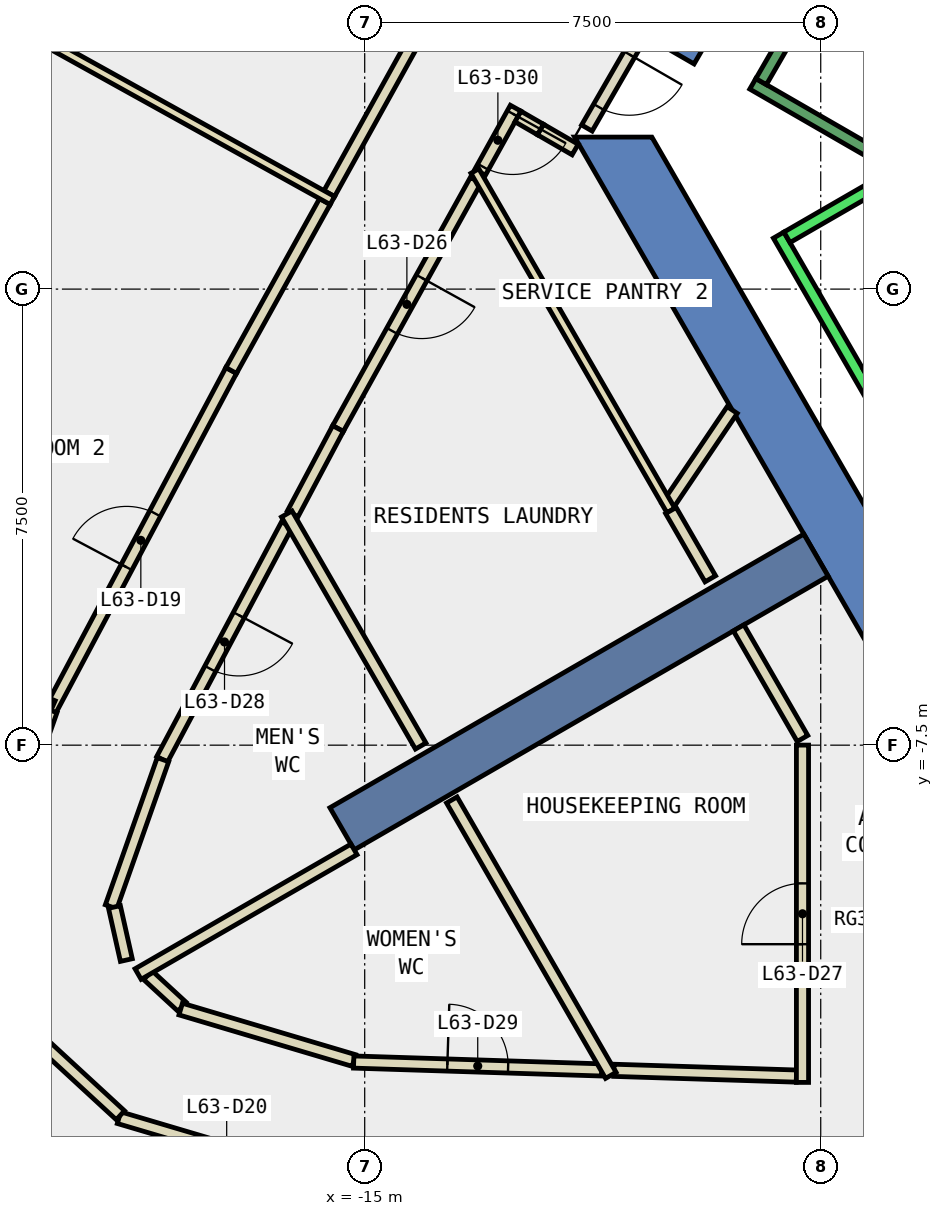
"""IFC4 building model, lengths in metres.
Left out: names, types, materials, properties, quantities, classifications, styles, units other than length and angle.
Written with IfcOpenShell. Run it as: python <this file> out.ifc"""

import sys

from ifc_helpers import new_model, si_unit, direction, frame, frame_2d, origin, place, context, subcontext, project, spatial, polyline, rectangle, outline, extrude, element, fill, save


model = new_model("IFC4")
c1 = context("Model", 3, precision=1e-05, world=origin(), true_north=direction((0.0, 1.0)))
c2 = subcontext(c1, "Body", "Model", "MODEL_VIEW")
j1 = project(units=[si_unit("LENGTHUNIT", "METRE"), si_unit("PLANEANGLEUNIT", "RADIAN")], contexts=[c1])
p1 = place(None, origin())
s1 = spatial("IfcSite", under=j1, at=p1, CompositionType="ELEMENT")
p2 = place(p1, origin())
s2 = spatial("IfcBuilding", under=s1, at=p2, CompositionType="ELEMENT")
p3 = place(p2, frame((0.0, 0.0, 273.8)))
s3 = spatial("IfcBuildingStorey", under=s2, at=p3, CompositionType="ELEMENT", Elevation=273.8)
p4 = place(p3, frame((0.0, 0.0, -0.34)))
e1 = element("IfcWall", 1, at=p4, inside=s3, PredefinedType="SHEAR", context=c2, shape_type="SweptSolid", body=[
    extrude(outline(polyline([(-10.535, 4.253), (-9.583, 3.703), (-5.138, 11.4), (-5.774, 12.5), (-10.535, 4.253)])), origin(), (0.0, 0.0, 1.0), 3.6),
])
p5 = place(p3, frame((0.0, 0.0, -0.34)))
e2 = element("IfcWall", 2, at=p5, inside=s3, PredefinedType="SHEAR", context=c2, shape_type="SweptSolid", body=[
    extrude(outline(polyline([(-11.547, 2.5), (-5.774, -7.5), (-5.138, -6.4), (-10.277, 2.5), (-11.547, 2.5)])), origin(), (0.0, 0.0, 1.0), 3.6),
])
p6 = place(p3, frame((-7.578, -4.375, -0.34), z_axis=(0.0, 0.0, 1.0), x_axis=(-0.866024315419, -0.5000018851, 0.0)))
e3 = element("IfcWall", 3, at=p6, inside=s3, PredefinedType="SHEAR", context=c2, shape_type="SweptSolid", body=[
    extrude(rectangle(XDim=9.0, YDim=0.8, at=frame_2d((4.5, 0.0))), origin(), (0.0, 0.0, 1.0), 3.6),
])
p7 = place(p3, frame((-19.984, 7.14, 0.0), z_axis=(0.0, 0.0, 1.0), x_axis=(-0.485049005017, -0.874486971162, 0.0)))
e4 = element("IfcWall", 4, at=p7, inside=s3, PredefinedType="STANDARD", context=c2, shape_type="SweptSolid", body=[
    extrude(rectangle(XDim=5.62, YDim=0.3, at=frame_2d((2.81, 0.0))), origin(), (0.0, 0.0, 1.0), 3.26),
])
p8 = place(p7, frame((0.455, 0.0, 0.9)))
e5 = element("IfcOpeningElement", 5, at=p8, cuts=e4, PredefinedType="OPENING", context=c2, shape_type="SweptSolid", body=[
    extrude(rectangle(XDim=1.9, YDim=2.0, at=frame_2d((0.95, 1.0))), frame((0.0, 0.16, 0.0), z_axis=(0.0, -1.0, 0.0), x_axis=(1.0, 0.0, 0.0)), (0.0, 0.0, 1.0), 0.32),
])
p9 = place(p7, frame((3.265, 0.0, 0.9)))
e6 = element("IfcOpeningElement", 6, at=p9, cuts=e4, PredefinedType="OPENING", context=c2, shape_type="SweptSolid", body=[
    extrude(rectangle(XDim=1.9, YDim=2.0, at=frame_2d((0.95, 1.0))), frame((0.0, 0.16, 0.0), z_axis=(0.0, -1.0, 0.0), x_axis=(1.0, 0.0, 0.0)), (0.0, 0.0, 1.0), 0.32),
])
p10 = place(p3, frame((-11.539, 2.295, 0.0), z_axis=(0.0, 0.0, 1.0), x_axis=(-0.86577241902, 0.500437926684, 0.0)))
e7 = element("IfcWall", 7, at=p10, inside=s3, PredefinedType="PARTITIONING", context=c2, shape_type="SweptSolid", body=[
    extrude(rectangle(XDim=0.66, YDim=0.2, at=frame_2d((0.33, 0.0))), origin(), (0.0, 0.0, 1.0), 2.4),
])
p11 = place(p3, frame((-12.517, 2.975, 0.0), z_axis=(0.0, 0.0, 1.0), x_axis=(-0.485195833999, -0.87440551386, 0.0)))
e8 = element("IfcWall", 8, at=p11, inside=s3, PredefinedType="PARTITIONING", context=c2, shape_type="SweptSolid", body=[
    extrude(rectangle(XDim=1.206, YDim=0.2, at=frame_2d((0.603, 0.0))), origin(), (0.0, 0.0, 1.0), 3.26),
])
p12 = place(p11, frame((0.103, 0.0, 0.0)))
e9 = element("IfcOpeningElement", 9, at=p12, cuts=e8, PredefinedType="OPENING", context=c2, shape_type="SweptSolid", body=[
    extrude(rectangle(XDim=1.0, YDim=2.1, at=frame_2d((0.5, 1.05))), frame((0.0, 0.11, 0.0), z_axis=(0.0, -1.0, 0.0), x_axis=(1.0, 0.0, 0.0)), (0.0, 0.0, 1.0), 0.22),
])
p13 = place(p3, frame((-13.174, 1.79, 0.0), z_axis=(0.0, 0.0, 1.0), x_axis=(-0.485079003918, -0.874470331091, 0.0)))
e10 = element("IfcWall", 10, at=p13, inside=s3, PredefinedType="PARTITIONING", context=c2, shape_type="SweptSolid", body=[
    extrude(rectangle(XDim=4.669, YDim=0.2, at=frame_2d((2.334, 0.0))), origin(), (0.0, 0.0, 1.0), 3.26),
])
p14 = place(p13, frame((1.834, 0.0, 0.0)))
e11 = element("IfcOpeningElement", 11, at=p14, cuts=e10, PredefinedType="OPENING", context=c2, shape_type="SweptSolid", body=[
    extrude(rectangle(XDim=1.0, YDim=2.1, at=frame_2d((0.5, 1.05))), frame((0.0, 0.11, 0.0), z_axis=(0.0, -1.0, 0.0), x_axis=(1.0, 0.0, 0.0)), (0.0, 0.0, 1.0), 0.22),
])
p15 = place(p3, frame((-15.439, -2.293, 0.0), z_axis=(0.0, 0.0, 1.0), x_axis=(-0.469248780065, -0.883066012486, 0.0)))
e12 = element("IfcWall", 12, at=p15, inside=s3, PredefinedType="PARTITIONING", context=c2, shape_type="SweptSolid", body=[
    extrude(rectangle(XDim=1.59, YDim=0.2, at=frame_2d((0.795, 0.0))), origin(), (0.0, 0.0, 1.0), 3.26),
])
p16 = place(p3, frame((-10.902, -12.847, 0.0), z_axis=(0.0, 0.0, 1.0), x_axis=(0.999500028713, -0.031617915847, 0.0)))
e13 = element("IfcWall", 13, at=p16, inside=s3, PredefinedType="PARTITIONING", context=c2, shape_type="SweptSolid", body=[
    extrude(rectangle(XDim=3.004, YDim=0.2, at=frame_2d((1.502, 0.0))), origin(), (0.0, 0.0, 1.0), 3.26),
])
p17 = place(p3, frame((-16.279, -3.873, 0.0), z_axis=(0.0, 0.0, 1.0), x_axis=(-0.469587967357, -0.882885689608, 0.0)))
e14 = element("IfcWall", 14, at=p17, inside=s3, PredefinedType="PARTITIONING", context=c2, shape_type="SweptSolid", body=[
    extrude(rectangle(XDim=4.372, YDim=0.2, at=frame_2d((2.186, 0.0))), origin(), (0.0, 0.0, 1.0), 3.26),
])
p18 = place(p17, frame((1.686, 0.0, 0.0)))
e15 = element("IfcOpeningElement", 15, at=p18, cuts=e14, PredefinedType="OPENING", context=c2, shape_type="SweptSolid", body=[
    extrude(rectangle(XDim=1.0, YDim=2.1, at=frame_2d((0.5, 1.05))), frame((0.0, 0.11, 0.0), z_axis=(0.0, -1.0, 0.0), x_axis=(1.0, 0.0, 0.0)), (0.0, 0.0, 1.0), 0.22),
])
p19 = place(p3, frame((-18.318, -7.739, 0.0), z_axis=(0.0, 0.0, 1.0), x_axis=(-0.332486504777, -0.943108012977, 0.0)))
e16 = element("IfcWall", 16, at=p19, inside=s3, PredefinedType="PARTITIONING", context=c2, shape_type="SweptSolid", body=[
    extrude(rectangle(XDim=2.565, YDim=0.2, at=frame_2d((1.282, 0.0))), origin(), (0.0, 0.0, 1.0), 3.26),
])
p20 = place(p3, frame((-19.116, -10.161, 0.0), z_axis=(0.0, 0.0, 1.0), x_axis=(0.219096654714, -0.975703159723, 0.0)))
e17 = element("IfcWall", 17, at=p20, inside=s3, PredefinedType="PARTITIONING", context=c2, shape_type="SweptSolid", body=[
    extrude(rectangle(XDim=0.895, YDim=0.2, at=frame_2d((0.447, 0.0))), origin(), (0.0, 0.0, 1.0), 3.26),
])
p21 = place(p3, frame((-18.567, -11.282, 0.0), z_axis=(0.0, 0.0, 1.0), x_axis=(0.735218904444, -0.677829744514, 0.0)))
e18 = element("IfcWall", 18, at=p21, inside=s3, PredefinedType="PARTITIONING", context=c2, shape_type="SweptSolid", body=[
    extrude(rectangle(XDim=0.766, YDim=0.2, at=frame_2d((0.383, 0.0))), origin(), (0.0, 0.0, 1.0), 3.26),
])
p22 = place(p3, frame((-18.026, -11.84, 0.0), z_axis=(0.0, 0.0, 1.0), x_axis=(0.958629704259, -0.284656090947, 0.0)))
e19 = element("IfcWall", 19, at=p22, inside=s3, PredefinedType="PARTITIONING", context=c2, shape_type="SweptSolid", body=[
    extrude(rectangle(XDim=2.972, YDim=0.2, at=frame_2d((1.486, 0.0))), origin(), (0.0, 0.0, 1.0), 3.26),
])
p23 = place(p3, frame((-15.181, -12.711, 0.0), z_axis=(0.0, 0.0, 1.0), x_axis=(0.999491493959, -0.031886572471, 0.0)))
e20 = element("IfcWall", 20, at=p23, inside=s3, PredefinedType="PARTITIONING", context=c2, shape_type="SweptSolid", body=[
    extrude(rectangle(XDim=4.081, YDim=0.2, at=frame_2d((2.041, 0.0))), origin(), (0.0, 0.0, 1.0), 3.26),
])
p24 = place(p23, frame((1.541, 0.0, 0.0)))
e21 = element("IfcOpeningElement", 21, at=p24, cuts=e20, PredefinedType="OPENING", context=c2, shape_type="SweptSolid", body=[
    extrude(rectangle(XDim=1.0, YDim=2.1, at=frame_2d((0.5, 1.05))), frame((0.0, 0.11, 0.0), z_axis=(0.0, -1.0, 0.0), x_axis=(1.0, 0.0, 0.0)), (0.0, 0.0, 1.0), 0.22),
])
p25 = place(p3, frame((-15.583, 1.571, 0.0), z_axis=(0.0, 0.0, 1.0), x_axis=(0.484944791944, 0.874544766588, 0.0)))
e22 = element("IfcWall", 22, at=p25, inside=s3, PredefinedType="PARTITIONING", context=c2, shape_type="SweptSolid", body=[
    extrude(rectangle(XDim=3.178, YDim=0.2, at=frame_2d((1.589, 0.0))), origin(), (0.0, 0.0, 1.0), 3.26),
])
p26 = place(p3, frame((-20.168, -6.926, 0.0), z_axis=(0.0, 0.0, 1.0), x_axis=(0.469552838911, 0.882904372778, 0.0)))
e23 = element("IfcWall", 23, at=p26, inside=s3, PredefinedType="PARTITIONING", context=c2, shape_type="SweptSolid", body=[
    extrude(rectangle(XDim=6.329, YDim=0.2, at=frame_2d((3.165, 0.0))), origin(), (0.0, 0.0, 1.0), 3.26),
])
p27 = place(p26, frame((2.665, 0.0, 0.0)))
e24 = element("IfcOpeningElement", 24, at=p27, cuts=e23, PredefinedType="OPENING", context=c2, shape_type="SweptSolid", body=[
    extrude(rectangle(XDim=1.0, YDim=2.1, at=frame_2d((0.5, 1.05))), frame((0.0, 0.11, 0.0), z_axis=(0.0, -1.0, 0.0), x_axis=(1.0, 0.0, 0.0)), (0.0, 0.0, 1.0), 0.22),
])
p28 = place(p3, frame((-17.196, -1.338, 0.0), z_axis=(0.0, 0.0, 1.0), x_axis=(0.485107756493, 0.87445438108, 0.0)))
e25 = element("IfcWall", 25, at=p28, inside=s3, PredefinedType="PARTITIONING", context=c2, shape_type="SweptSolid", body=[
    extrude(rectangle(XDim=3.177, YDim=0.2, at=frame_2d((1.588, 0.0))), origin(), (0.0, 0.0, 1.0), 3.26),
])
p29 = place(p3, frame((-15.499, -14.676, 0.0), z_axis=(0.0, 0.0, 1.0), x_axis=(-0.958734738219, 0.284302131073, 0.0)))
e26 = element("IfcWall", 26, at=p29, inside=s3, PredefinedType="PARTITIONING", context=c2, shape_type="SweptSolid", body=[
    extrude(rectangle(XDim=3.693, YDim=0.2, at=frame_2d((1.847, 0.0))), origin(), (0.0, 0.0, 1.0), 3.26),
])
p30 = place(p29, frame((1.347, 0.0, 0.0)))
e27 = element("IfcOpeningElement", 27, at=p30, cuts=e26, PredefinedType="OPENING", context=c2, shape_type="SweptSolid", body=[
    extrude(rectangle(XDim=1.0, YDim=2.1, at=frame_2d((0.5, 1.05))), frame((0.0, 0.11, 0.0), z_axis=(0.0, -1.0, 0.0), x_axis=(1.0, 0.0, 0.0)), (0.0, 0.0, 1.0), 0.22),
])
p31 = place(p3, frame((-19.018, -13.586, 0.0), z_axis=(0.0, 0.0, 1.0), x_axis=(-0.735547704352, 0.67747293276, 0.0)))
e28 = element("IfcWall", 28, at=p31, inside=s3, PredefinedType="PARTITIONING", context=c2, shape_type="SweptSolid", body=[
    extrude(rectangle(XDim=2.463, YDim=0.2, at=frame_2d((1.232, 0.0))), origin(), (0.0, 0.0, 1.0), 3.26),
])
p32 = place(p3, frame((-21.248, -10.035, 0.0), z_axis=(0.0, 0.0, 1.0), x_axis=(0.332233916116, 0.943197023417, 0.0)))
e29 = element("IfcWall", 29, at=p32, inside=s3, PredefinedType="PARTITIONING", context=c2, shape_type="SweptSolid", body=[
    extrude(rectangle(XDim=3.29, YDim=0.2, at=frame_2d((1.645, 0.0))), origin(), (0.0, 0.0, 1.0), 3.26),
])
p33 = place(p3, frame((-10.028, -3.575, 0.0), z_axis=(0.0, 0.0, 1.0), x_axis=(0.559779346026, 0.828641710127, 0.0)))
e30 = element("IfcWall", 30, at=p33, inside=s3, PredefinedType="PARTITIONING", context=c2, shape_type="SweptSolid", body=[
    extrude(rectangle(XDim=1.915, YDim=0.2, at=frame_2d((0.958, 0.0))), origin(), (0.0, 0.0, 1.0), 3.26),
])
p34 = place(p3, frame((-13.188, 1.942, 0.0), z_axis=(0.0, 0.0, 1.0), x_axis=(0.500061177503, -0.865990080056, 0.0)))
e31 = element("IfcWall", 31, at=p34, inside=s3, PredefinedType="PARTITIONING", context=c2, shape_type="SweptSolid", body=[
    extrude(rectangle(XDim=6.447, YDim=0.15, at=frame_2d((3.224, 0.0))), origin(), (0.0, 0.0, 1.0), 3.26),
])
p35 = place(p3, frame((-9.316, -4.764, 0.0), z_axis=(0.0, 0.0, 1.0), x_axis=(-0.49996696679, 0.866044474677, 0.0)))
e32 = element("IfcWall", 32, at=p35, inside=s3, PredefinedType="PARTITIONING", context=c2, shape_type="SweptSolid", body=[
    extrude(rectangle(XDim=1.296, YDim=0.2, at=frame_2d((0.648, 0.0))), origin(), (0.0, 0.0, 1.0), 3.26),
])
p36 = place(p3, frame((-7.8, -13.046, 0.0), z_axis=(0.0, 0.0, 1.0), x_axis=(0.0, 1.0, 0.0)))
e33 = element("IfcWall", 33, at=p36, inside=s3, PredefinedType="PARTITIONING", context=c2, shape_type="SweptSolid", body=[
    extrude(rectangle(XDim=5.547, YDim=0.2, at=frame_2d((2.773, 0.0))), origin(), (0.0, 0.0, 1.0), 3.26),
])
p37 = place(p36, frame((2.273, 0.0, 0.0)))
e34 = element("IfcOpeningElement", 34, at=p37, cuts=e33, PredefinedType="OPENING", context=c2, shape_type="SweptSolid", body=[
    extrude(rectangle(XDim=1.0, YDim=2.1, at=frame_2d((0.5, 1.05))), frame((0.0, 0.11, 0.0), z_axis=(0.0, -1.0, 0.0), x_axis=(1.0, 0.0, 0.0)), (0.0, 0.0, 1.0), 0.22),
])
p38 = place(p3, frame((-7.8, -7.39, 0.0), z_axis=(0.0, 0.0, 1.0), x_axis=(-0.499977374825, 0.866038466041, 0.0)))
e35 = element("IfcWall", 35, at=p38, inside=s3, PredefinedType="PARTITIONING", context=c2, shape_type="SweptSolid", body=[
    extrude(rectangle(XDim=2.1, YDim=0.2, at=frame_2d((1.05, 0.0))), origin(), (0.0, 0.0, 1.0), 3.26),
])
p39 = place(p3, frame((-14.079, -7.514, 0.0), z_axis=(0.0, 0.0, 1.0), x_axis=(-0.499959077901, 0.86604902888, 0.0)))
e36 = element("IfcWall", 36, at=p39, inside=s3, PredefinedType="PARTITIONING", context=c2, shape_type="SweptSolid", body=[
    extrude(rectangle(XDim=4.406, YDim=0.2, at=frame_2d((2.203, 0.0))), origin(), (0.0, 0.0, 1.0), 3.26),
])
p40 = place(p3, frame((-10.952, -12.93, 0.0), z_axis=(0.0, 0.0, 1.0), x_axis=(-0.50002013732, 0.866013777185, 0.0)))
e37 = element("IfcWall", 37, at=p40, inside=s3, PredefinedType="PARTITIONING", context=c2, shape_type="SweptSolid", body=[
    extrude(rectangle(XDim=5.23, YDim=0.2, at=frame_2d((2.615, 0.0))), origin(), (0.0, 0.0, 1.0), 3.26),
])
p41 = place(p3, frame((-15.176, -9.214, 0.0), z_axis=(0.0, 0.0, 1.0), x_axis=(-0.86606561423, -0.499930346997, 0.0)))
e38 = element("IfcWall", 38, at=p41, inside=s3, PredefinedType="PARTITIONING", context=c2, shape_type="SweptSolid", body=[
    extrude(rectangle(XDim=4.1, YDim=0.2, at=frame_2d((2.05, 0.0))), origin(), (0.0, 0.0, 1.0), 3.26),
])
p42 = place(p3, frame((-15.532, 1.457, 0.0), z_axis=(0.0, 0.0, 1.0), x_axis=(-0.874467143452, 0.485084750351, 0.0)))
e39 = element("IfcWall", 39, at=p42, inside=s3, PredefinedType="PARTITIONING", context=c2, shape_type="SweptSolid", body=[
    extrude(rectangle(XDim=6.5, YDim=0.15, at=frame_2d((3.25, 0.0))), origin(), (0.0, 0.0, 1.0), 3.26),
])
p43 = place(p3, frame((-20.121, -6.838, 0.0), z_axis=(0.0, 0.0, 1.0), x_axis=(-0.91561994307, 0.402044922679, 0.0)))
e40 = element("IfcWall", 40, at=p43, inside=s3, PredefinedType="PARTITIONING", context=c2, shape_type="SweptSolid", body=[
    extrude(rectangle(XDim=5.096, YDim=0.15, at=frame_2d((2.548, 0.0))), origin(), (0.0, 0.0, 1.0), 3.26),
])
p44 = place(p3, frame((-10.449, 4.203, 0.0), z_axis=(0.0, 0.0, 1.0), x_axis=(-0.499914839587, -0.866074565589, 0.0)))
e41 = element("IfcWall", 41, at=p44, inside=s3, PredefinedType="PARTITIONING", context=c2, shape_type="SweptSolid", body=[
    extrude(rectangle(XDim=1.794, YDim=0.2, at=frame_2d((0.897, 0.0))), origin(), (0.0, 0.0, 1.0), 2.4),
])
p45 = place(p44, frame((0.397, 0.0, 0.0)))
e42 = element("IfcOpeningElement", 42, at=p45, cuts=e41, PredefinedType="OPENING", context=c2, shape_type="SweptSolid", body=[
    extrude(rectangle(XDim=1.0, YDim=2.1, at=frame_2d((0.5, 1.05))), frame((0.0, 0.11, 0.0), z_axis=(0.0, -1.0, 0.0), x_axis=(1.0, 0.0, 0.0)), (0.0, 0.0, 1.0), 0.22),
])
p46 = place(p3, frame((-12.11, 2.625, 0.0), z_axis=(0.0, 0.0, 1.0), x_axis=(-0.86611877815, 0.499838235968, 0.0)))
e43 = element("IfcWall", 43, at=p46, inside=s3, PredefinedType="PARTITIONING", context=c2, shape_type="SweptSolid", body=[
    extrude(rectangle(XDim=0.426, YDim=0.2, at=frame_2d((0.213, 0.0))), origin(), (0.0, 0.0, 1.0), 3.26),
])
p47 = place(p3, frame((-8.192, 0.888, 0.0), z_axis=(0.0, 0.0, 1.0), x_axis=(0.500034260056, -0.866005622828, 0.0)))
e44 = element("IfcWall", 44, at=p47, inside=s3, PredefinedType="STANDARD", context=c2, shape_type="SweptSolid", body=[
    extrude(rectangle(XDim=5.399, YDim=0.2, at=frame_2d((2.7, 0.0))), origin(), (0.0, 0.0, 1.0), 3.26),
])
for number, where, z_axis, x_axis in (
    (45, (-5.977, 2.052, 0.0), (0.0, 0.0, 1.0), (-0.866, -0.5, 0.0)),
    (46, (-4.677, -0.2, 0.0), (0.0, 0.0, 1.0), (-0.866, -0.5, 0.0)),
):
    element("IfcWall", number, at=place(p3, frame(where, z_axis=z_axis, x_axis=x_axis)), inside=s3, PredefinedType="STANDARD", context=c2, shape_type="SweptSolid", body=[
        extrude(rectangle(XDim=2.399, YDim=0.2, at=frame_2d((1.2, 0.0))), origin(), (0.0, 0.0, 1.0), 3.26),
    ])
p48 = place(p3, frame((-6.25, 2.01, 0.0), z_axis=(0.0, 0.0, 1.0), x_axis=(-0.86611865017, 0.499838457731, 0.0)))
e47 = element("IfcWall", 47, at=p48, inside=s3, PredefinedType="STANDARD", context=c2, shape_type="SweptSolid", body=[
    extrude(rectangle(XDim=2.733, YDim=0.2, at=frame_2d((1.366, 0.0))), origin(), (0.0, 0.0, 1.0), 3.26),
])
p49 = place(p3, frame((-5.03, 9.388, 0.0), z_axis=(0.0, 0.0, 1.0), x_axis=(-0.499978703459, -0.866037698999, 0.0)))
e48 = element("IfcWall", 48, at=p49, inside=s3, PredefinedType="STANDARD", context=c2, shape_type="SweptSolid", body=[
    extrude(rectangle(XDim=6.9, YDim=0.2, at=frame_2d((3.45, 0.0))), origin(), (0.0, 0.0, 1.0), 3.26),
])
p50 = place(p27, origin())
e49 = element("IfcDoor", 49, at=p50, inside=s3, OperationType="SINGLE_SWING_LEFT", PredefinedType="DOOR", context=c2, shape_type="SweptSolid", body=[
    extrude(rectangle(XDim=1.0, YDim=2.1, at=frame_2d((0.5, 1.05))), frame((0.0, 0.025, 0.0), z_axis=(0.0, -1.0, 0.0), x_axis=(1.0, 0.0, 0.0)), (0.0, 0.0, 1.0), 0.05),
])
fill(e24, e49)
p51 = place(p14, origin())
e50 = element("IfcDoor", 50, at=p51, inside=s3, OperationType="SINGLE_SWING_LEFT", PredefinedType="DOOR", context=c2, shape_type="SweptSolid", body=[
    extrude(rectangle(XDim=1.0, YDim=2.1, at=frame_2d((0.5, 1.05))), frame((0.0, 0.025, 0.0), z_axis=(0.0, -1.0, 0.0), x_axis=(1.0, 0.0, 0.0)), (0.0, 0.0, 1.0), 0.05),
])
fill(e11, e50)
p52 = place(p37, origin())
e51 = element("IfcDoor", 51, at=p52, inside=s3, OperationType="SINGLE_SWING_LEFT", PredefinedType="DOOR", context=c2, shape_type="SweptSolid", body=[
    extrude(rectangle(XDim=1.0, YDim=2.1, at=frame_2d((0.5, 1.05))), frame((0.0, 0.025, 0.0), z_axis=(0.0, -1.0, 0.0), x_axis=(1.0, 0.0, 0.0)), (0.0, 0.0, 1.0), 0.05),
])
fill(e34, e51)
p53 = place(p18, origin())
e52 = element("IfcDoor", 52, at=p53, inside=s3, OperationType="SINGLE_SWING_LEFT", PredefinedType="DOOR", context=c2, shape_type="SweptSolid", body=[
    extrude(rectangle(XDim=1.0, YDim=2.1, at=frame_2d((0.5, 1.05))), frame((0.0, 0.025, 0.0), z_axis=(0.0, -1.0, 0.0), x_axis=(1.0, 0.0, 0.0)), (0.0, 0.0, 1.0), 0.05),
])
fill(e15, e52)
p54 = place(p24, origin())
e53 = element("IfcDoor", 53, at=p54, inside=s3, OperationType="SINGLE_SWING_LEFT", PredefinedType="DOOR", context=c2, shape_type="SweptSolid", body=[
    extrude(rectangle(XDim=1.0, YDim=2.1, at=frame_2d((0.5, 1.05))), frame((0.0, 0.025, 0.0), z_axis=(0.0, -1.0, 0.0), x_axis=(1.0, 0.0, 0.0)), (0.0, 0.0, 1.0), 0.05),
])
fill(e21, e53)
p55 = place(p12, origin())
e54 = element("IfcDoor", 54, at=p55, inside=s3, OperationType="SINGLE_SWING_RIGHT", PredefinedType="DOOR", context=c2, shape_type="SweptSolid", body=[
    extrude(rectangle(XDim=1.0, YDim=2.1, at=frame_2d((0.5, 1.05))), frame((0.0, 0.025, 0.0), z_axis=(0.0, -1.0, 0.0), x_axis=(1.0, 0.0, 0.0)), (0.0, 0.0, 1.0), 0.05),
])
fill(e9, e54)
p56 = place(p45, origin())
e55 = element("IfcDoor", 55, at=p56, inside=s3, OperationType="SINGLE_SWING_LEFT", PredefinedType="DOOR", context=c2, shape_type="SweptSolid", body=[
    extrude(rectangle(XDim=1.0, YDim=2.1, at=frame_2d((0.5, 1.05))), frame((0.0, 0.025, 0.0), z_axis=(0.0, -1.0, 0.0), x_axis=(1.0, 0.0, 0.0)), (0.0, 0.0, 1.0), 0.05),
])
fill(e42, e55)
save(model, sys.argv[1])
